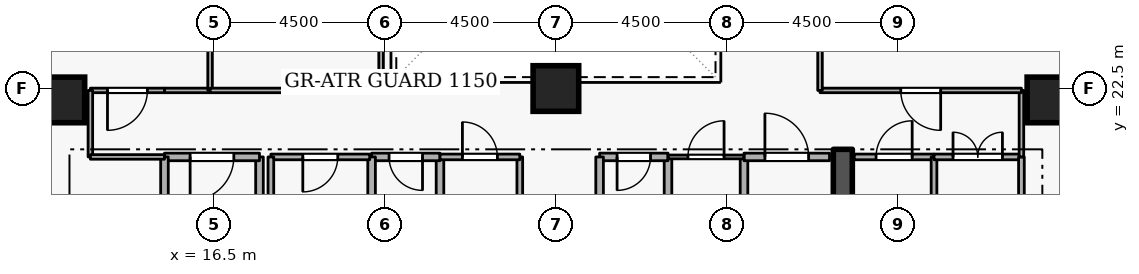
"""IFC4 building model, lengths in metres.
Left out: names, types, materials, properties, quantities, classifications, styles, units other than length and angle.
Written with IfcOpenShell. Run it as: python <this file> out.ifc"""

import sys

from ifc_helpers import new_model, si_unit, direction, frame, frame_2d, origin, origin_2d, place, context, subcontext, project, spatial, rectangle, extrude, element, fill, save


model = new_model("IFC4")
c1 = context("Model", 3, precision=1e-05, world=origin(), true_north=direction((0.0, 1.0)))
c2 = subcontext(c1, "Body", "Model", "MODEL_VIEW")
j1 = project(units=[si_unit("LENGTHUNIT", "METRE"), si_unit("PLANEANGLEUNIT", "RADIAN")], contexts=[c1])
p1 = place(None, origin())
s1 = spatial("IfcSite", under=j1, at=p1, CompositionType="ELEMENT")
p2 = place(p1, origin())
s2 = spatial("IfcBuilding", under=s1, at=p2, CompositionType="ELEMENT")
p3 = place(p2, frame((0.0, 0.0, 134.1)))
s3 = spatial("IfcBuildingStorey", under=s2, at=p3, CompositionType="ELEMENT", Elevation=134.1)
p4 = place(p3, frame((33.05, 15.1, 0.0), z_axis=(0.0, 0.0, 1.0), x_axis=(0.0, 1.0, 0.0)))
e1 = element("IfcWall", 1, at=p4, inside=s3, PredefinedType="SHEAR", context=c2, shape_type="SweptSolid", body=[
    extrude(rectangle(XDim=5.8, YDim=0.5, at=frame_2d((2.9, 0.0))), origin(), (0.0, 0.0, 1.0), 3.6),
])
for number, where, z_axis, x_axis in (
    (2, (12.5, 22.2, 0.0), (0.0, 0.0, 1.0), (1.0, 0.0, 0.0)),
    (3, (38.5, 22.2, 0.0), (0.0, 0.0, 1.0), (1.0, 0.0, 0.0)),
    (4, (25.5, 22.5, 0.0), (0.0, 0.0, 1.0), (1.0, 0.0, 0.0)),
):
    element("IfcColumn", number, at=place(p3, frame(where, z_axis=z_axis, x_axis=x_axis)), inside=s3, PredefinedType="COLUMN", context=c2, shape_type="SweptSolid", body=[
        extrude(rectangle(XDim=1.2, YDim=1.2, at=origin_2d()), origin(), (0.0, 0.0, 1.0), 3.6),
    ])
p5 = place(p3, frame((17.7, 18.4, 0.0), z_axis=(0.0, 0.0, 1.0), x_axis=(0.0, 1.0, 0.0)))
e5 = element("IfcWall", 5, at=p5, inside=s3, PredefinedType="STANDARD", context=c2, shape_type="SweptSolid", body=[
    extrude(rectangle(XDim=2.3, YDim=0.2, at=frame_2d((1.15, 0.0))), origin(), (0.0, 0.0, 1.0), 2.545),
])
p6 = place(p3, frame((17.7, 20.7, 0.0), z_axis=(0.0, 0.0, 1.0), x_axis=(-1.0, 0.0, 0.0)))
e6 = element("IfcWall", 6, at=p6, inside=s3, PredefinedType="STANDARD", context=c2, shape_type="SweptSolid", body=[
    extrude(rectangle(XDim=2.5, YDim=0.2, at=frame_2d((1.25, 0.0))), origin(), (0.0, 0.0, 1.0), 3.34),
])
p7 = place(p6, frame((0.675, 0.0, 0.0)))
e7 = element("IfcOpeningElement", 7, at=p7, cuts=e6, PredefinedType="OPENING", context=c2, shape_type="SweptSolid", body=[
    extrude(rectangle(XDim=1.15, YDim=2.1, at=frame_2d((0.575, 1.05))), frame((0.0, 0.11, 0.0), z_axis=(0.0, -1.0, 0.0), x_axis=(1.0, 0.0, 0.0)), (0.0, 0.0, 1.0), 0.22),
])
p8 = place(p3, frame((15.2, 20.7, 0.0), z_axis=(0.0, 0.0, 1.0), x_axis=(0.0, -1.0, 0.0)))
e8 = element("IfcWall", 8, at=p8, inside=s3, PredefinedType="STANDARD", context=c2, shape_type="SweptSolid", body=[
    extrude(rectangle(XDim=5.7, YDim=0.2, at=frame_2d((2.85, 0.0))), origin(), (0.0, 0.0, 1.0), 3.34),
])
p9 = place(p3, frame((28.45, 18.65, 0.0), z_axis=(0.0, 0.0, 1.0), x_axis=(0.0, 1.0, 0.0)))
e9 = element("IfcWall", 9, at=p9, inside=s3, PredefinedType="STANDARD", context=c2, shape_type="SweptSolid", body=[
    extrude(rectangle(XDim=2.05, YDim=0.2, at=frame_2d((1.025, 0.0))), origin(), (0.0, 0.0, 1.0), 3.34),
])
p10 = place(p3, frame((28.45, 20.7, 0.0), z_axis=(0.0, 0.0, 1.0), x_axis=(-1.0, 0.0, 0.0)))
e10 = element("IfcWall", 10, at=p10, inside=s3, PredefinedType="STANDARD", context=c2, shape_type="SweptSolid", body=[
    extrude(rectangle(XDim=1.8, YDim=0.2, at=frame_2d((0.9, 0.0))), origin(), (0.0, 0.0, 1.0), 3.34),
])
p11 = place(p10, frame((0.46, 0.0, 0.0)))
e11 = element("IfcOpeningElement", 11, at=p11, cuts=e10, PredefinedType="OPENING", context=c2, shape_type="SweptSolid", body=[
    extrude(rectangle(XDim=0.88, YDim=2.04, at=frame_2d((0.44, 1.02))), frame((0.0, 0.11, 0.0), z_axis=(0.0, -1.0, 0.0), x_axis=(1.0, 0.0, 0.0)), (0.0, 0.0, 1.0), 0.22),
])
for number, where, z_axis, x_axis in (
    (12, (26.65, 20.7, 0.0), (0.0, 0.0, 1.0), (0.0, -1.0, 0.0)),
    (13, (22.45, 18.65, 0.0), (0.0, 0.0, 1.0), (0.0, 1.0, 0.0)),
):
    element("IfcWall", number, at=place(p3, frame(where, z_axis=z_axis, x_axis=x_axis)), inside=s3, PredefinedType="STANDARD", context=c2, shape_type="SweptSolid", body=[
        extrude(rectangle(XDim=2.05, YDim=0.2, at=frame_2d((1.025, 0.0))), origin(), (0.0, 0.0, 1.0), 3.34),
    ])
p12 = place(p3, frame((22.45, 20.7, 0.0), z_axis=(0.0, 0.0, 1.0), x_axis=(-1.0, 0.0, 0.0)))
e14 = element("IfcWall", 14, at=p12, inside=s3, PredefinedType="STANDARD", context=c2, shape_type="SweptSolid", body=[
    extrude(rectangle(XDim=1.8, YDim=0.2, at=frame_2d((0.9, 0.0))), origin(), (0.0, 0.0, 1.0), 3.34),
])
p13 = place(p12, frame((0.46, 0.0, 0.0)))
e15 = element("IfcOpeningElement", 15, at=p13, cuts=e14, PredefinedType="OPENING", context=c2, shape_type="SweptSolid", body=[
    extrude(rectangle(XDim=0.88, YDim=2.04, at=frame_2d((0.44, 1.02))), frame((0.0, 0.11, 0.0), z_axis=(0.0, -1.0, 0.0), x_axis=(1.0, 0.0, 0.0)), (0.0, 0.0, 1.0), 0.22),
])
for number, where, z_axis, x_axis in (
    (16, (20.65, 20.7, 0.0), (0.0, 0.0, 1.0), (0.0, -1.0, 0.0)),
    (17, (30.45, 18.65, 0.0), (0.0, 0.0, 1.0), (0.0, 1.0, 0.0)),
):
    element("IfcWall", number, at=place(p3, frame(where, z_axis=z_axis, x_axis=x_axis)), inside=s3, PredefinedType="STANDARD", context=c2, shape_type="SweptSolid", body=[
        extrude(rectangle(XDim=2.05, YDim=0.2, at=frame_2d((1.025, 0.0))), origin(), (0.0, 0.0, 1.0), 3.34),
    ])
p14 = place(p3, frame((30.45, 20.7, 0.0), z_axis=(0.0, 0.0, 1.0), x_axis=(1.0, 0.0, 0.0)))
e18 = element("IfcWall", 18, at=p14, inside=s3, PredefinedType="STANDARD", context=c2, shape_type="SweptSolid", body=[
    extrude(rectangle(XDim=2.25, YDim=0.2, at=frame_2d((1.125, 0.0))), origin(), (0.0, 0.0, 1.0), 3.34),
])
p15 = place(p14, frame((0.55, 0.0, 0.0)))
e19 = element("IfcOpeningElement", 19, at=p15, cuts=e18, PredefinedType="OPENING", context=c2, shape_type="SweptSolid", body=[
    extrude(rectangle(XDim=1.15, YDim=2.1, at=frame_2d((0.575, 1.05))), frame((0.0, 0.11, 0.0), z_axis=(0.0, -1.0, 0.0), x_axis=(1.0, 0.0, 0.0)), (0.0, 0.0, 1.0), 0.22),
])
p16 = place(p3, frame((20.6, 20.7, 0.0), z_axis=(0.0, 0.0, 1.0), x_axis=(-1.0, 0.0, 0.0)))
e20 = element("IfcWall", 20, at=p16, inside=s3, PredefinedType="PARTITIONING", context=c2, shape_type="SweptSolid", body=[
    extrude(rectangle(XDim=2.6, YDim=0.15, at=frame_2d((1.3, 0.0))), origin(), (0.0, 0.0, 1.0), 3.34),
])
p17 = place(p16, frame((0.84, 0.0, 0.0)))
e21 = element("IfcOpeningElement", 21, at=p17, cuts=e20, PredefinedType="OPENING", context=c2, shape_type="SweptSolid", body=[
    extrude(rectangle(XDim=0.92, YDim=2.08, at=frame_2d((0.46, 1.04))), frame((0.0, 0.085, 0.0), z_axis=(0.0, -1.0, 0.0), x_axis=(1.0, 0.0, 0.0)), (0.0, 0.0, 1.0), 0.17),
])
p18 = place(p3, frame((18.0, 20.7, 0.0), z_axis=(0.0, 0.0, 1.0), x_axis=(0.0, -1.0, 0.0)))
e22 = element("IfcWall", 22, at=p18, inside=s3, PredefinedType="PARTITIONING", context=c2, shape_type="SweptSolid", body=[
    extrude(rectangle(XDim=2.05, YDim=0.15, at=frame_2d((1.025, 0.0))), origin(), (0.0, 0.0, 1.0), 2.545),
])
p19 = place(p3, frame((24.55, 20.7, 0.0), z_axis=(0.0, 0.0, 1.0), x_axis=(0.0, -1.0, 0.0)))
e23 = element("IfcWall", 23, at=p19, inside=s3, PredefinedType="PARTITIONING", context=c2, shape_type="SweptSolid", body=[
    extrude(rectangle(XDim=2.05, YDim=0.15, at=frame_2d((1.025, 0.0))), origin(), (0.0, 0.0, 1.0), 3.34),
])
p20 = place(p3, frame((22.45, 20.7, 0.0), z_axis=(0.0, 0.0, 1.0), x_axis=(1.0, 0.0, 0.0)))
e24 = element("IfcWall", 24, at=p20, inside=s3, PredefinedType="PARTITIONING", context=c2, shape_type="SweptSolid", body=[
    extrude(rectangle(XDim=2.1, YDim=0.15, at=frame_2d((1.05, 0.0))), origin(), (0.0, 0.0, 1.0), 3.34),
])
p21 = place(p20, frame((0.59, 0.0, 0.0)))
e25 = element("IfcOpeningElement", 25, at=p21, cuts=e24, PredefinedType="OPENING", context=c2, shape_type="SweptSolid", body=[
    extrude(rectangle(XDim=0.92, YDim=2.08, at=frame_2d((0.46, 1.04))), frame((0.0, 0.085, 0.0), z_axis=(0.0, -1.0, 0.0), x_axis=(1.0, 0.0, 0.0)), (0.0, 0.0, 1.0), 0.17),
])
p22 = place(p3, frame((28.45, 20.7, 0.0), z_axis=(0.0, 0.0, 1.0), x_axis=(1.0, 0.0, 0.0)))
e26 = element("IfcWall", 26, at=p22, inside=s3, PredefinedType="PARTITIONING", context=c2, shape_type="SweptSolid", body=[
    extrude(rectangle(XDim=2.0, YDim=0.1, at=frame_2d((1.0, 0.0))), origin(), (0.0, 0.0, 1.0), 3.34),
])
p23 = place(p22, frame((0.525, 0.0, 0.0)))
e27 = element("IfcOpeningElement", 27, at=p23, cuts=e26, PredefinedType="OPENING", context=c2, shape_type="SweptSolid", body=[
    extrude(rectangle(XDim=0.95, YDim=2.1, at=frame_2d((0.475, 1.05))), frame((0.0, 0.06, 0.0), z_axis=(0.0, -1.0, 0.0), x_axis=(1.0, 0.0, 0.0)), (0.0, 0.0, 1.0), 0.12),
])
p24 = place(p3, frame((33.35, 20.7, 0.0), z_axis=(0.0, 0.0, 1.0), x_axis=(1.0, 0.0, 0.0)))
e28 = element("IfcWall", 28, at=p24, inside=s3, PredefinedType="PARTITIONING", context=c2, shape_type="SweptSolid", body=[
    extrude(rectangle(XDim=2.1, YDim=0.15, at=frame_2d((1.05, 0.0))), origin(), (0.0, 0.0, 1.0), 3.34),
])
p25 = place(p24, frame((0.575, 0.0, 0.0)))
e29 = element("IfcOpeningElement", 29, at=p25, cuts=e28, PredefinedType="OPENING", context=c2, shape_type="SweptSolid", body=[
    extrude(rectangle(XDim=0.95, YDim=2.1, at=frame_2d((0.475, 1.05))), frame((0.0, 0.085, 0.0), z_axis=(0.0, -1.0, 0.0), x_axis=(1.0, 0.0, 0.0)), (0.0, 0.0, 1.0), 0.17),
])
p26 = place(p3, frame((35.45, 20.7, 0.0), z_axis=(0.0, 0.0, 1.0), x_axis=(0.0, -1.0, 0.0)))
e30 = element("IfcWall", 30, at=p26, inside=s3, PredefinedType="PARTITIONING", context=c2, shape_type="SweptSolid", body=[
    extrude(rectangle(XDim=5.65, YDim=0.15, at=frame_2d((2.825, 0.0))), origin(), (0.0, 0.0, 1.0), 3.34),
])
p27 = place(p3, frame((35.45, 20.7, 0.0), z_axis=(0.0, 0.0, 1.0), x_axis=(1.0, 0.0, 0.0)))
e31 = element("IfcWall", 31, at=p27, inside=s3, PredefinedType="PARTITIONING", context=c2, shape_type="SweptSolid", body=[
    extrude(rectangle(XDim=2.3, YDim=0.15, at=frame_2d((1.15, 0.0))), origin(), (0.0, 0.0, 1.0), 3.34),
])
p28 = place(p27, frame((0.5, 0.0, 0.0)))
e32 = element("IfcOpeningElement", 32, at=p28, cuts=e31, PredefinedType="OPENING", context=c2, shape_type="SweptSolid", body=[
    extrude(rectangle(XDim=1.3, YDim=2.12, at=frame_2d((0.65, 1.06))), frame((0.0, 0.085, 0.0), z_axis=(0.0, -1.0, 0.0), x_axis=(1.0, 0.0, 0.0)), (0.0, 0.0, 1.0), 0.17),
])
p29 = place(p3, frame((37.75, 20.7, 0.0), z_axis=(0.0, 0.0, 1.0), x_axis=(0.0, -1.0, 0.0)))
e33 = element("IfcWall", 33, at=p29, inside=s3, PredefinedType="PARTITIONING", context=c2, shape_type="SweptSolid", body=[
    extrude(rectangle(XDim=5.65, YDim=0.15, at=frame_2d((2.825, 0.0))), origin(), (0.0, 0.0, 1.0), 3.34),
])
p30 = place(p3, frame((16.4, 22.45, 0.0), z_axis=(0.0, 0.0, 1.0), x_axis=(-1.0, 0.0, 0.0)))
e34 = element("IfcWall", 34, at=p30, inside=s3, PredefinedType="PARTITIONING", context=c2, shape_type="SweptSolid", body=[
    extrude(rectangle(XDim=1.2, YDim=0.12, at=frame_2d((0.6, 0.0))), origin(), (0.0, 0.0, 1.0), 3.34),
])
p31 = place(p3, frame((15.2, 22.45, 0.0), z_axis=(0.0, 0.0, 1.0), x_axis=(-1.0, 0.0, 0.0)))
e35 = element("IfcWall", 35, at=p31, inside=s3, PredefinedType="PARTITIONING", context=c2, shape_type="SweptSolid", body=[
    extrude(rectangle(XDim=1.95, YDim=0.12, at=frame_2d((0.975, 0.0))), origin(), (0.0, 0.0, 1.0), 3.34),
])
p32 = place(p31, frame((0.45, 0.0, 0.0)))
e36 = element("IfcOpeningElement", 36, at=p32, cuts=e35, PredefinedType="OPENING", context=c2, shape_type="SweptSolid", body=[
    extrude(rectangle(XDim=1.05, YDim=2.1, at=frame_2d((0.525, 1.05))), frame((0.0, 0.07, 0.0), z_axis=(0.0, -1.0, 0.0), x_axis=(1.0, 0.0, 0.0)), (0.0, 0.0, 1.0), 0.14),
])
p33 = place(p3, frame((13.25, 22.45, 0.0), z_axis=(0.0, 0.0, 1.0), x_axis=(0.0, -1.0, 0.0)))
e37 = element("IfcWall", 37, at=p33, inside=s3, PredefinedType="PARTITIONING", context=c2, shape_type="SweptSolid", body=[
    extrude(rectangle(XDim=1.75, YDim=0.12, at=frame_2d((0.875, 0.0))), origin(), (0.0, 0.0, 1.0), 3.34),
])
p34 = place(p3, frame((13.25, 20.7, 0.0), z_axis=(0.0, 0.0, 1.0), x_axis=(1.0, 0.0, 0.0)))
e38 = element("IfcWall", 38, at=p34, inside=s3, PredefinedType="PARTITIONING", context=c2, shape_type="SweptSolid", body=[
    extrude(rectangle(XDim=1.95, YDim=0.12, at=frame_2d((0.975, 0.0))), origin(), (0.0, 0.0, 1.0), 3.34),
])
p35 = place(p3, frame((16.4, 27.0, 0.0), z_axis=(0.0, 0.0, 1.0), x_axis=(0.0, -1.0, 0.0)))
e39 = element("IfcWall", 39, at=p35, inside=s3, PredefinedType="PARTITIONING", context=c2, shape_type="SweptSolid", body=[
    extrude(rectangle(XDim=4.55, YDim=0.12, at=frame_2d((2.275, 0.0))), origin(), (0.0, 0.0, 1.0), 3.34),
])
p36 = place(p3, frame((20.9, 31.55, 0.0), z_axis=(0.0, 0.0, 1.0), x_axis=(0.0, -1.0, 0.0)))
e40 = element("IfcWall", 40, at=p36, inside=s3, PredefinedType="PARTITIONING", context=c2, shape_type="SweptSolid", body=[
    extrude(rectangle(XDim=9.1, YDim=0.12, at=frame_2d((4.55, 0.0))), origin(), (0.0, 0.0, 1.0), 3.34),
])
p37 = place(p3, frame((20.9, 22.45, 0.0), z_axis=(0.0, 0.0, 1.0), x_axis=(-1.0, 0.0, 0.0)))
e41 = element("IfcWall", 41, at=p37, inside=s3, PredefinedType="PARTITIONING", context=c2, shape_type="SweptSolid", body=[
    extrude(rectangle(XDim=4.5, YDim=0.12, at=frame_2d((2.25, 0.0))), origin(), (0.0, 0.0, 1.0), 3.34),
])
p38 = place(p3, frame((37.75, 20.7, 0.0), z_axis=(0.0, 0.0, 1.0), x_axis=(0.0, 1.0, 0.0)))
e42 = element("IfcWall", 42, at=p38, inside=s3, PredefinedType="PARTITIONING", context=c2, shape_type="SweptSolid", body=[
    extrude(rectangle(XDim=1.75, YDim=0.12, at=frame_2d((0.875, 0.0))), origin(), (0.0, 0.0, 1.0), 3.34),
])
p39 = place(p3, frame((37.75, 22.45, 0.0), z_axis=(0.0, 0.0, 1.0), x_axis=(-1.0, 0.0, 0.0)))
e43 = element("IfcWall", 43, at=p39, inside=s3, PredefinedType="PARTITIONING", context=c2, shape_type="SweptSolid", body=[
    extrude(rectangle(XDim=5.3, YDim=0.12, at=frame_2d((2.65, 0.0))), origin(), (0.0, 0.0, 1.0), 3.34),
])
p40 = place(p39, frame((2.125, 0.0, 0.0)))
e44 = element("IfcOpeningElement", 44, at=p40, cuts=e43, PredefinedType="OPENING", context=c2, shape_type="SweptSolid", body=[
    extrude(rectangle(XDim=1.05, YDim=2.1, at=frame_2d((0.525, 1.05))), frame((0.0, 0.07, 0.0), z_axis=(0.0, -1.0, 0.0), x_axis=(1.0, 0.0, 0.0)), (0.0, 0.0, 1.0), 0.14),
])
p41 = place(p3, frame((32.45, 22.45, 0.0), z_axis=(0.0, 0.0, 1.0), x_axis=(0.0, 1.0, 0.0)))
e45 = element("IfcWall", 45, at=p41, inside=s3, PredefinedType="PARTITIONING", context=c2, shape_type="SweptSolid", body=[
    extrude(rectangle(XDim=2.95, YDim=0.12, at=frame_2d((1.475, 0.0))), origin(), (0.0, 0.0, 1.0), 3.34),
])
p42 = place(p7, origin())
e46 = element("IfcDoor", 46, at=p42, inside=s3, OperationType="SINGLE_SWING_RIGHT", PredefinedType="DOOR", context=c2, shape_type="SweptSolid", body=[
    extrude(rectangle(XDim=1.15, YDim=2.1, at=frame_2d((0.575, 1.05))), frame((0.0, 0.025, 0.0), z_axis=(0.0, -1.0, 0.0), x_axis=(1.0, 0.0, 0.0)), (0.0, 0.0, 1.0), 0.05),
])
fill(e7, e46)
p43 = place(p11, origin())
e47 = element("IfcDoor", 47, at=p43, inside=s3, OperationType="SINGLE_SWING_RIGHT", PredefinedType="DOOR", context=c2, shape_type="SweptSolid", body=[
    extrude(rectangle(XDim=0.88, YDim=2.04, at=frame_2d((0.44, 1.02))), frame((0.0, 0.025, 0.0), z_axis=(0.0, -1.0, 0.0), x_axis=(1.0, 0.0, 0.0)), (0.0, 0.0, 1.0), 0.05),
])
fill(e11, e47)
p44 = place(p13, origin())
e48 = element("IfcDoor", 48, at=p44, inside=s3, OperationType="SINGLE_SWING_LEFT", PredefinedType="DOOR", context=c2, shape_type="SweptSolid", body=[
    extrude(rectangle(XDim=0.88, YDim=2.04, at=frame_2d((0.44, 1.02))), frame((0.0, 0.025, 0.0), z_axis=(0.0, -1.0, 0.0), x_axis=(1.0, 0.0, 0.0)), (0.0, 0.0, 1.0), 0.05),
])
fill(e15, e48)
p45 = place(p17, origin())
e49 = element("IfcDoor", 49, at=p45, inside=s3, OperationType="SINGLE_SWING_RIGHT", PredefinedType="DOOR", context=c2, shape_type="SweptSolid", body=[
    extrude(rectangle(XDim=0.92, YDim=2.08, at=frame_2d((0.46, 1.04))), frame((0.0, 0.025, 0.0), z_axis=(0.0, -1.0, 0.0), x_axis=(1.0, 0.0, 0.0)), (0.0, 0.0, 1.0), 0.05),
])
fill(e21, e49)
p46 = place(p21, origin())
e50 = element("IfcDoor", 50, at=p46, inside=s3, OperationType="SINGLE_SWING_LEFT", PredefinedType="DOOR", context=c2, shape_type="SweptSolid", body=[
    extrude(rectangle(XDim=0.92, YDim=2.08, at=frame_2d((0.46, 1.04))), frame((0.0, 0.025, 0.0), z_axis=(0.0, -1.0, 0.0), x_axis=(1.0, 0.0, 0.0)), (0.0, 0.0, 1.0), 0.05),
])
fill(e25, e50)
p47 = place(p23, origin())
e51 = element("IfcDoor", 51, at=p47, inside=s3, OperationType="SINGLE_SWING_RIGHT", PredefinedType="DOOR", context=c2, shape_type="SweptSolid", body=[
    extrude(rectangle(XDim=0.95, YDim=2.1, at=frame_2d((0.475, 1.05))), frame((0.0, 0.025, 0.0), z_axis=(0.0, -1.0, 0.0), x_axis=(1.0, 0.0, 0.0)), (0.0, 0.0, 1.0), 0.05),
])
fill(e27, e51)
p48 = place(p15, origin())
e52 = element("IfcDoor", 52, at=p48, inside=s3, OperationType="SINGLE_SWING_LEFT", PredefinedType="DOOR", context=c2, shape_type="SweptSolid", body=[
    extrude(rectangle(XDim=1.15, YDim=2.1, at=frame_2d((0.575, 1.05))), frame((0.0, 0.025, 0.0), z_axis=(0.0, -1.0, 0.0), x_axis=(1.0, 0.0, 0.0)), (0.0, 0.0, 1.0), 0.05),
])
fill(e19, e52)
p49 = place(p25, origin())
e53 = element("IfcDoor", 53, at=p49, inside=s3, OperationType="SINGLE_SWING_RIGHT", PredefinedType="DOOR", context=c2, shape_type="SweptSolid", body=[
    extrude(rectangle(XDim=0.95, YDim=2.1, at=frame_2d((0.475, 1.05))), frame((0.0, 0.025, 0.0), z_axis=(0.0, -1.0, 0.0), x_axis=(1.0, 0.0, 0.0)), (0.0, 0.0, 1.0), 0.05),
])
fill(e29, e53)
p50 = place(p28, origin())
e54 = element("IfcDoor", 54, at=p50, inside=s3, OperationType="DOUBLE_DOOR_SINGLE_SWING", PredefinedType="DOOR", context=c2, shape_type="SweptSolid", body=[
    extrude(rectangle(XDim=1.3, YDim=2.12, at=frame_2d((0.65, 1.06))), frame((0.0, 0.025, 0.0), z_axis=(0.0, -1.0, 0.0), x_axis=(1.0, 0.0, 0.0)), (0.0, 0.0, 1.0), 0.05),
])
fill(e32, e54)
p51 = place(p32, origin())
e55 = element("IfcDoor", 55, at=p51, inside=s3, OperationType="SINGLE_SWING_RIGHT", PredefinedType="DOOR", context=c2, shape_type="SweptSolid", body=[
    extrude(rectangle(XDim=1.05, YDim=2.1, at=frame_2d((0.525, 1.05))), frame((0.0, 0.025, 0.0), z_axis=(0.0, -1.0, 0.0), x_axis=(1.0, 0.0, 0.0)), (0.0, 0.0, 1.0), 0.05),
])
fill(e36, e55)
p52 = place(p40, origin())
e56 = element("IfcDoor", 56, at=p52, inside=s3, OperationType="SINGLE_SWING_LEFT", PredefinedType="DOOR", context=c2, shape_type="SweptSolid", body=[
    extrude(rectangle(XDim=1.05, YDim=2.1, at=frame_2d((0.525, 1.05))), frame((0.0, 0.025, 0.0), z_axis=(0.0, -1.0, 0.0), x_axis=(1.0, 0.0, 0.0)), (0.0, 0.0, 1.0), 0.05),
])
fill(e44, e56)
save(model, sys.argv[1])
